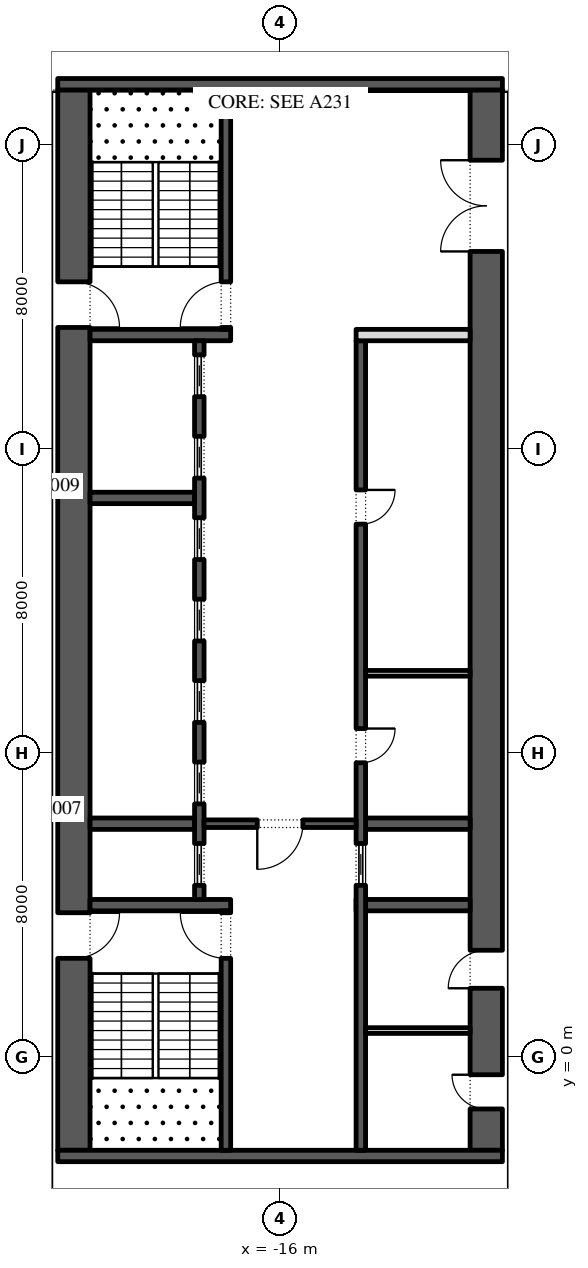
"""IFC4 building model, lengths in metres.
Left out: names, types, materials, properties, quantities, classifications, styles, units other than length and angle.
Written with IfcOpenShell. Run it as: python <this file> out.ifc"""

import sys

from ifc_helpers import new_model, si_unit, direction, frame, frame_2d, origin, place, context, subcontext, project, spatial, rectangle, extrude, element, fill, save


model = new_model("IFC4")
c1 = context("Model", 3, precision=1e-05, world=origin(), true_north=direction((0.0, 1.0)))
c2 = subcontext(c1, "Body", "Model", "MODEL_VIEW")
j1 = project(units=[si_unit("LENGTHUNIT", "METRE"), si_unit("PLANEANGLEUNIT", "RADIAN")], contexts=[c1])
p1 = place(None, origin())
s1 = spatial("IfcSite", under=j1, at=p1, CompositionType="ELEMENT")
p2 = place(p1, origin())
s2 = spatial("IfcBuilding", under=s1, at=p2, CompositionType="ELEMENT")
p3 = place(p2, frame((0.0, 0.0, 130.8)))
s3 = spatial("IfcBuildingStorey", under=s2, at=p3, CompositionType="ELEMENT", Elevation=130.8)
p4 = place(p3, frame((-21.425, -2.45, 0.0), z_axis=(0.0, 0.0, 1.0), x_axis=(0.0, 1.0, 0.0)))
e1 = element("IfcWall", 1, at=p4, inside=s3, PredefinedType="SHEAR", context=c2, shape_type="SweptSolid", body=[
    extrude(rectangle(XDim=27.9, YDim=0.85, at=frame_2d((13.95, 0.0))), origin(), (0.0, 0.0, 1.0), 4.0),
])
p5 = place(p4, frame((5.05, 0.0, 0.0)))
e2 = element("IfcOpeningElement", 2, at=p5, cuts=e1, PredefinedType="OPENING", context=c2, shape_type="SweptSolid", body=[
    extrude(rectangle(XDim=1.2, YDim=2.1, at=frame_2d((0.6, 1.05))), frame((0.0, 0.435, 0.0), z_axis=(0.0, -1.0, 0.0), x_axis=(1.0, 0.0, 0.0)), (0.0, 0.0, 1.0), 0.87),
])
p6 = place(p4, frame((21.65, 0.0, 0.0)))
e3 = element("IfcOpeningElement", 3, at=p6, cuts=e1, PredefinedType="OPENING", context=c2, shape_type="SweptSolid", body=[
    extrude(rectangle(XDim=1.2, YDim=2.1, at=frame_2d((0.6, 1.05))), frame((0.0, 0.435, 0.0), z_axis=(0.0, -1.0, 0.0), x_axis=(1.0, 0.0, 0.0)), (0.0, 0.0, 1.0), 0.87),
])
p7 = place(p3, frame((-10.575, -2.45, 0.0), z_axis=(0.0, 0.0, 1.0), x_axis=(0.0, 1.0, 0.0)))
e4 = element("IfcWall", 4, at=p7, inside=s3, PredefinedType="SHEAR", context=c2, shape_type="SweptSolid", body=[
    extrude(rectangle(XDim=27.9, YDim=0.85, at=frame_2d((13.95, 0.0))), origin(), (0.0, 0.0, 1.0), 4.0),
])
p8 = place(p7, frame((23.65, 0.0, 0.0)))
e5 = element("IfcOpeningElement", 5, at=p8, cuts=e4, PredefinedType="OPENING", context=c2, shape_type="SweptSolid", body=[
    extrude(rectangle(XDim=2.4, YDim=2.1, at=frame_2d((1.2, 1.05))), frame((0.0, 0.435, 0.0), z_axis=(0.0, -1.0, 0.0), x_axis=(1.0, 0.0, 0.0)), (0.0, 0.0, 1.0), 0.87),
])
p9 = place(p7, frame((1.087, 0.0, 0.0)))
e6 = element("IfcOpeningElement", 6, at=p9, cuts=e4, PredefinedType="OPENING", context=c2, shape_type="SweptSolid", body=[
    extrude(rectangle(XDim=0.9, YDim=2.1, at=frame_2d((0.45, 1.05))), frame((0.0, 0.435, 0.0), z_axis=(0.0, -1.0, 0.0), x_axis=(1.0, 0.0, 0.0)), (0.0, 0.0, 1.0), 0.87),
])
p10 = place(p7, frame((4.262, 0.0, 0.0)))
e7 = element("IfcOpeningElement", 7, at=p10, cuts=e4, PredefinedType="OPENING", context=c2, shape_type="SweptSolid", body=[
    extrude(rectangle(XDim=1.0, YDim=2.1, at=frame_2d((0.5, 1.05))), frame((0.0, 0.435, 0.0), z_axis=(0.0, -1.0, 0.0), x_axis=(1.0, 0.0, 0.0)), (0.0, 0.0, 1.0), 0.87),
])
for number, where, z_axis, x_axis in (
    (8, (-21.85, -2.6, 0.0), (0.0, 0.0, 1.0), (1.0, 0.0, 0.0)),
    (9, (-21.85, 25.6, 0.0), (0.0, 0.0, 1.0), (1.0, 0.0, 0.0)),
):
    element("IfcWall", number, at=place(p3, frame(where, z_axis=z_axis, x_axis=x_axis)), inside=s3, PredefinedType="SHEAR", context=c2, shape_type="SweptSolid", body=[
        extrude(rectangle(XDim=11.7, YDim=0.3, at=frame_2d((5.85, 0.0))), origin(), (0.0, 0.0, 1.0), 4.0),
    ])
p11 = place(p3, frame((-21.0, 4.0, 0.0), z_axis=(0.0, 0.0, 1.0), x_axis=(1.0, 0.0, 0.0)))
e10 = element("IfcWall", 10, at=p11, inside=s3, PredefinedType="SHEAR", context=c2, shape_type="SweptSolid", body=[
    extrude(rectangle(XDim=3.7, YDim=0.3, at=frame_2d((1.85, 0.0))), origin(), (0.0, 0.0, 1.0), 4.0),
])
p12 = place(p3, frame((-17.425, -2.45, 0.0), z_axis=(0.0, 0.0, 1.0), x_axis=(0.0, 1.0, 0.0)))
e11 = element("IfcWall", 11, at=p12, inside=s3, PredefinedType="SHEAR", context=c2, shape_type="SweptSolid", body=[
    extrude(rectangle(XDim=6.3, YDim=0.25, at=frame_2d((3.15, 0.0))), origin(), (0.0, 0.0, 1.0), 4.0),
])
p13 = place(p12, frame((5.05, 0.0, 0.0)))
e12 = element("IfcOpeningElement", 12, at=p13, cuts=e11, PredefinedType="OPENING", context=c2, shape_type="SweptSolid", body=[
    extrude(rectangle(XDim=1.2, YDim=2.1, at=frame_2d((0.6, 1.05))), frame((0.0, 0.135, 0.0), z_axis=(0.0, -1.0, 0.0), x_axis=(1.0, 0.0, 0.0)), (0.0, 0.0, 1.0), 0.27),
])
p14 = place(p3, frame((-21.0, 19.0, 0.0), z_axis=(0.0, 0.0, 1.0), x_axis=(1.0, 0.0, 0.0)))
e13 = element("IfcWall", 13, at=p14, inside=s3, PredefinedType="SHEAR", context=c2, shape_type="SweptSolid", body=[
    extrude(rectangle(XDim=3.7, YDim=0.3, at=frame_2d((1.85, 0.0))), origin(), (0.0, 0.0, 1.0), 4.0),
])
p15 = place(p3, frame((-17.425, 19.15, 0.0), z_axis=(0.0, 0.0, 1.0), x_axis=(0.0, 1.0, 0.0)))
e14 = element("IfcWall", 14, at=p15, inside=s3, PredefinedType="SHEAR", context=c2, shape_type="SweptSolid", body=[
    extrude(rectangle(XDim=6.3, YDim=0.25, at=frame_2d((3.15, 0.0))), origin(), (0.0, 0.0, 1.0), 4.0),
])
p16 = place(p15, frame((0.05, 0.0, 0.0)))
e15 = element("IfcOpeningElement", 15, at=p16, cuts=e14, PredefinedType="OPENING", context=c2, shape_type="SweptSolid", body=[
    extrude(rectangle(XDim=1.2, YDim=2.1, at=frame_2d((0.6, 1.05))), frame((0.0, 0.135, 0.0), z_axis=(0.0, -1.0, 0.0), x_axis=(1.0, 0.0, 0.0)), (0.0, 0.0, 1.0), 0.27),
])
for number, where, z_axis, x_axis in (
    (16, (-21.0, 6.143, 0.0), (0.0, 0.0, 1.0), (1.0, 0.0, 0.0)),
    (17, (-21.0, 14.714, 0.0), (0.0, 0.0, 1.0), (1.0, 0.0, 0.0)),
):
    element("IfcWall", number, at=place(p3, frame(where, z_axis=z_axis, x_axis=x_axis)), inside=s3, PredefinedType="SHEAR", context=c2, shape_type="SweptSolid", body=[
        extrude(rectangle(XDim=2.75, YDim=0.3, at=frame_2d((1.375, 0.0))), origin(), (0.0, 0.0, 1.0), 4.0),
    ])
p17 = place(p3, frame((-18.125, 4.15, 0.0), z_axis=(0.0, 0.0, 1.0), x_axis=(0.0, 1.0, 0.0)))
e18 = element("IfcWall", 18, at=p17, inside=s3, PredefinedType="SHEAR", context=c2, shape_type="SweptSolid", body=[
    extrude(rectangle(XDim=14.7, YDim=0.25, at=frame_2d((7.35, 0.0))), origin(), (0.0, 0.0, 1.0), 4.0),
])
p18 = place(p17, frame((0.371, 0.0, 0.0)))
e19 = element("IfcOpeningElement", 19, at=p18, cuts=e18, PredefinedType="OPENING", context=c2, shape_type="SweptSolid", body=[
    extrude(rectangle(XDim=1.1, YDim=2.1, at=frame_2d((0.55, 1.05))), frame((0.0, 0.135, 0.0), z_axis=(0.0, -1.0, 0.0), x_axis=(1.0, 0.0, 0.0)), (0.0, 0.0, 1.0), 0.27),
])
p19 = place(p17, frame((2.514, 0.0, 0.0)))
e20 = element("IfcOpeningElement", 20, at=p19, cuts=e18, PredefinedType="OPENING", context=c2, shape_type="SweptSolid", body=[
    extrude(rectangle(XDim=1.1, YDim=2.1, at=frame_2d((0.55, 1.05))), frame((0.0, 0.135, 0.0), z_axis=(0.0, -1.0, 0.0), x_axis=(1.0, 0.0, 0.0)), (0.0, 0.0, 1.0), 0.27),
])
p20 = place(p17, frame((4.657, 0.0, 0.0)))
e21 = element("IfcOpeningElement", 21, at=p20, cuts=e18, PredefinedType="OPENING", context=c2, shape_type="SweptSolid", body=[
    extrude(rectangle(XDim=1.1, YDim=2.1, at=frame_2d((0.55, 1.05))), frame((0.0, 0.135, 0.0), z_axis=(0.0, -1.0, 0.0), x_axis=(1.0, 0.0, 0.0)), (0.0, 0.0, 1.0), 0.27),
])
p21 = place(p17, frame((6.8, 0.0, 0.0)))
e22 = element("IfcOpeningElement", 22, at=p21, cuts=e18, PredefinedType="OPENING", context=c2, shape_type="SweptSolid", body=[
    extrude(rectangle(XDim=1.1, YDim=2.1, at=frame_2d((0.55, 1.05))), frame((0.0, 0.135, 0.0), z_axis=(0.0, -1.0, 0.0), x_axis=(1.0, 0.0, 0.0)), (0.0, 0.0, 1.0), 0.27),
])
p22 = place(p17, frame((8.943, 0.0, 0.0)))
e23 = element("IfcOpeningElement", 23, at=p22, cuts=e18, PredefinedType="OPENING", context=c2, shape_type="SweptSolid", body=[
    extrude(rectangle(XDim=1.1, YDim=2.1, at=frame_2d((0.55, 1.05))), frame((0.0, 0.135, 0.0), z_axis=(0.0, -1.0, 0.0), x_axis=(1.0, 0.0, 0.0)), (0.0, 0.0, 1.0), 0.27),
])
p23 = place(p17, frame((11.086, 0.0, 0.0)))
e24 = element("IfcOpeningElement", 24, at=p23, cuts=e18, PredefinedType="OPENING", context=c2, shape_type="SweptSolid", body=[
    extrude(rectangle(XDim=1.1, YDim=2.1, at=frame_2d((0.55, 1.05))), frame((0.0, 0.135, 0.0), z_axis=(0.0, -1.0, 0.0), x_axis=(1.0, 0.0, 0.0)), (0.0, 0.0, 1.0), 0.27),
])
p24 = place(p17, frame((13.229, 0.0, 0.0)))
e25 = element("IfcOpeningElement", 25, at=p24, cuts=e18, PredefinedType="OPENING", context=c2, shape_type="SweptSolid", body=[
    extrude(rectangle(XDim=1.1, YDim=2.1, at=frame_2d((0.55, 1.05))), frame((0.0, 0.135, 0.0), z_axis=(0.0, -1.0, 0.0), x_axis=(1.0, 0.0, 0.0)), (0.0, 0.0, 1.0), 0.27),
])
p25 = place(p3, frame((-14.0, 4.0, 0.0), z_axis=(0.0, 0.0, 1.0), x_axis=(1.0, 0.0, 0.0)))
e26 = element("IfcWall", 26, at=p25, inside=s3, PredefinedType="SHEAR", context=c2, shape_type="SweptSolid", body=[
    extrude(rectangle(XDim=3.0, YDim=0.3, at=frame_2d((1.5, 0.0))), origin(), (0.0, 0.0, 1.0), 4.0),
])
p26 = place(p3, frame((-13.75, 6.143, 0.0), z_axis=(0.0, 0.0, 1.0), x_axis=(1.0, 0.0, 0.0)))
e27 = element("IfcWall", 27, at=p26, inside=s3, PredefinedType="SHEAR", context=c2, shape_type="SweptSolid", body=[
    extrude(rectangle(XDim=2.75, YDim=0.3, at=frame_2d((1.375, 0.0))), origin(), (0.0, 0.0, 1.0), 4.0),
])
p27 = place(p3, frame((-13.875, -2.45, 0.0), z_axis=(0.0, 0.0, 1.0), x_axis=(0.0, 1.0, 0.0)))
e28 = element("IfcWall", 28, at=p27, inside=s3, PredefinedType="SHEAR", context=c2, shape_type="SweptSolid", body=[
    extrude(rectangle(XDim=21.3, YDim=0.25, at=frame_2d((10.65, 0.0))), origin(), (0.0, 0.0, 1.0), 4.0),
])
p28 = place(p27, frame((10.196, 0.0, 0.0)))
e29 = element("IfcOpeningElement", 29, at=p28, cuts=e28, PredefinedType="OPENING", context=c2, shape_type="SweptSolid", body=[
    extrude(rectangle(XDim=0.9, YDim=2.1, at=frame_2d((0.45, 1.05))), frame((0.0, 0.135, 0.0), z_axis=(0.0, -1.0, 0.0), x_axis=(1.0, 0.0, 0.0)), (0.0, 0.0, 1.0), 0.27),
])
p29 = place(p27, frame((16.475, 0.0, 0.0)))
e30 = element("IfcOpeningElement", 30, at=p29, cuts=e28, PredefinedType="OPENING", context=c2, shape_type="SweptSolid", body=[
    extrude(rectangle(XDim=0.9, YDim=2.1, at=frame_2d((0.45, 1.05))), frame((0.0, 0.135, 0.0), z_axis=(0.0, -1.0, 0.0), x_axis=(1.0, 0.0, 0.0)), (0.0, 0.0, 1.0), 0.27),
])
p30 = place(p27, frame((6.971, 0.0, 0.0)))
e31 = element("IfcOpeningElement", 31, at=p30, cuts=e28, PredefinedType="OPENING", context=c2, shape_type="SweptSolid", body=[
    extrude(rectangle(XDim=1.1, YDim=2.1, at=frame_2d((0.55, 1.05))), frame((0.0, 0.135, 0.0), z_axis=(0.0, -1.0, 0.0), x_axis=(1.0, 0.0, 0.0)), (0.0, 0.0, 1.0), 0.27),
])
p31 = place(p3, frame((-14.0, 19.0, 0.0), z_axis=(0.0, 0.0, 1.0), x_axis=(1.0, 0.0, 0.0)))
e32 = element("IfcWall", 32, at=p31, inside=s3, PredefinedType="PARTITIONING", context=c2, shape_type="SweptSolid", body=[
    extrude(rectangle(XDim=3.0, YDim=0.3, at=frame_2d((1.5, 0.0))), origin(), (0.0, 0.0, 1.0), 4.0),
])
p32 = place(p3, frame((-13.75, 10.1, 0.0), z_axis=(0.0, 0.0, 1.0), x_axis=(1.0, 0.0, 0.0)))
e33 = element("IfcWall", 33, at=p32, inside=s3, PredefinedType="PARTITIONING", context=c2, shape_type="SweptSolid", body=[
    extrude(rectangle(XDim=2.75, YDim=0.15, at=frame_2d((1.375, 0.0))), origin(), (0.0, 0.0, 1.0), 4.0),
])
p33 = place(p3, frame((-18.0, 6.143, 0.0), z_axis=(0.0, 0.0, 1.0), x_axis=(1.0, 0.0, 0.0)))
e34 = element("IfcWall", 34, at=p33, inside=s3, PredefinedType="SHEAR", context=c2, shape_type="SweptSolid", body=[
    extrude(rectangle(XDim=4.0, YDim=0.2, at=frame_2d((2.0, 0.0))), origin(), (0.0, 0.0, 1.0), 4.0),
])
p34 = place(p33, frame((1.4, 0.0, 0.0)))
e35 = element("IfcOpeningElement", 35, at=p34, cuts=e34, PredefinedType="OPENING", context=c2, shape_type="SweptSolid", body=[
    extrude(rectangle(XDim=1.2, YDim=2.1, at=frame_2d((0.6, 1.05))), frame((0.0, 0.11, 0.0), z_axis=(0.0, -1.0, 0.0), x_axis=(1.0, 0.0, 0.0)), (0.0, 0.0, 1.0), 0.22),
])
p35 = place(p3, frame((-13.75, 0.7, 0.0), z_axis=(0.0, 0.0, 1.0), x_axis=(1.0, 0.0, 0.0)))
e36 = element("IfcWall", 36, at=p35, inside=s3, PredefinedType="PARTITIONING", context=c2, shape_type="SweptSolid", body=[
    extrude(rectangle(XDim=2.75, YDim=0.15, at=frame_2d((1.375, 0.0))), origin(), (0.0, 0.0, 1.0), 4.0),
])
p36 = place(p18, origin())
e37 = element("IfcDoor", 37, at=p36, inside=s3, OperationType="SLIDING_TO_LEFT", PredefinedType="DOOR", context=c2, shape_type="SweptSolid", body=[
    extrude(rectangle(XDim=1.1, YDim=2.1, at=frame_2d((0.55, 1.05))), frame((0.0, 0.025, 0.0), z_axis=(0.0, -1.0, 0.0), x_axis=(1.0, 0.0, 0.0)), (0.0, 0.0, 1.0), 0.05),
])
fill(e19, e37)
p37 = place(p19, origin())
e38 = element("IfcDoor", 38, at=p37, inside=s3, OperationType="SLIDING_TO_LEFT", PredefinedType="DOOR", context=c2, shape_type="SweptSolid", body=[
    extrude(rectangle(XDim=1.1, YDim=2.1, at=frame_2d((0.55, 1.05))), frame((0.0, 0.025, 0.0), z_axis=(0.0, -1.0, 0.0), x_axis=(1.0, 0.0, 0.0)), (0.0, 0.0, 1.0), 0.05),
])
fill(e20, e38)
p38 = place(p20, origin())
e39 = element("IfcDoor", 39, at=p38, inside=s3, OperationType="SLIDING_TO_LEFT", PredefinedType="DOOR", context=c2, shape_type="SweptSolid", body=[
    extrude(rectangle(XDim=1.1, YDim=2.1, at=frame_2d((0.55, 1.05))), frame((0.0, 0.025, 0.0), z_axis=(0.0, -1.0, 0.0), x_axis=(1.0, 0.0, 0.0)), (0.0, 0.0, 1.0), 0.05),
])
fill(e21, e39)
p39 = place(p21, origin())
e40 = element("IfcDoor", 40, at=p39, inside=s3, OperationType="SLIDING_TO_LEFT", PredefinedType="DOOR", context=c2, shape_type="SweptSolid", body=[
    extrude(rectangle(XDim=1.1, YDim=2.1, at=frame_2d((0.55, 1.05))), frame((0.0, 0.025, 0.0), z_axis=(0.0, -1.0, 0.0), x_axis=(1.0, 0.0, 0.0)), (0.0, 0.0, 1.0), 0.05),
])
fill(e22, e40)
p40 = place(p22, origin())
e41 = element("IfcDoor", 41, at=p40, inside=s3, OperationType="SLIDING_TO_LEFT", PredefinedType="DOOR", context=c2, shape_type="SweptSolid", body=[
    extrude(rectangle(XDim=1.1, YDim=2.1, at=frame_2d((0.55, 1.05))), frame((0.0, 0.025, 0.0), z_axis=(0.0, -1.0, 0.0), x_axis=(1.0, 0.0, 0.0)), (0.0, 0.0, 1.0), 0.05),
])
fill(e23, e41)
p41 = place(p23, origin())
e42 = element("IfcDoor", 42, at=p41, inside=s3, OperationType="SLIDING_TO_LEFT", PredefinedType="DOOR", context=c2, shape_type="SweptSolid", body=[
    extrude(rectangle(XDim=1.1, YDim=2.1, at=frame_2d((0.55, 1.05))), frame((0.0, 0.025, 0.0), z_axis=(0.0, -1.0, 0.0), x_axis=(1.0, 0.0, 0.0)), (0.0, 0.0, 1.0), 0.05),
])
fill(e24, e42)
p42 = place(p24, origin())
e43 = element("IfcDoor", 43, at=p42, inside=s3, OperationType="SLIDING_TO_LEFT", PredefinedType="DOOR", context=c2, shape_type="SweptSolid", body=[
    extrude(rectangle(XDim=1.1, YDim=2.1, at=frame_2d((0.55, 1.05))), frame((0.0, 0.025, 0.0), z_axis=(0.0, -1.0, 0.0), x_axis=(1.0, 0.0, 0.0)), (0.0, 0.0, 1.0), 0.05),
])
fill(e25, e43)
p43 = place(p28, frame((0.9, -0.2, 0.0), z_axis=(0.0, 0.0, 1.0), x_axis=(-1.0, 0.0, 0.0)))
e44 = element("IfcDoor", 44, at=p43, inside=s3, OperationType="SINGLE_SWING_RIGHT", PredefinedType="DOOR", context=c2, shape_type="SweptSolid", body=[
    extrude(rectangle(XDim=0.9, YDim=2.1, at=frame_2d((0.45, 1.05))), frame((0.0, -0.075, 0.0), z_axis=(0.0, -1.0, 0.0), x_axis=(1.0, 0.0, 0.0)), (0.0, 0.0, 1.0), 0.05),
])
fill(e29, e44)
p44 = place(p29, frame((0.9, -0.2, 0.0), z_axis=(0.0, 0.0, 1.0), x_axis=(-1.0, 0.0, 0.0)))
e45 = element("IfcDoor", 45, at=p44, inside=s3, OperationType="SINGLE_SWING_RIGHT", PredefinedType="DOOR", context=c2, shape_type="SweptSolid", body=[
    extrude(rectangle(XDim=0.9, YDim=2.1, at=frame_2d((0.45, 1.05))), frame((0.0, -0.075, 0.0), z_axis=(0.0, -1.0, 0.0), x_axis=(1.0, 0.0, 0.0)), (0.0, 0.0, 1.0), 0.05),
])
fill(e30, e45)
p45 = place(p30, origin())
e46 = element("IfcDoor", 46, at=p45, inside=s3, OperationType="SLIDING_TO_LEFT", PredefinedType="DOOR", context=c2, shape_type="SweptSolid", body=[
    extrude(rectangle(XDim=1.1, YDim=2.1, at=frame_2d((0.55, 1.05))), frame((0.0, 0.025, 0.0), z_axis=(0.0, -1.0, 0.0), x_axis=(1.0, 0.0, 0.0)), (0.0, 0.0, 1.0), 0.05),
])
fill(e31, e46)
p46 = place(p34, frame((1.2, 0.0, 0.0), z_axis=(0.0, 0.0, 1.0), x_axis=(-1.0, 0.0, 0.0)))
e47 = element("IfcDoor", 47, at=p46, inside=s3, OperationType="SINGLE_SWING_LEFT", PredefinedType="DOOR", context=c2, shape_type="SweptSolid", body=[
    extrude(rectangle(XDim=1.2, YDim=2.1, at=frame_2d((0.6, 1.05))), frame((0.0, 0.025, 0.0), z_axis=(0.0, -1.0, 0.0), x_axis=(1.0, 0.0, 0.0)), (0.0, 0.0, 1.0), 0.05),
])
fill(e35, e47)
p47 = place(p8, origin())
e48 = element("IfcDoor", 48, at=p47, inside=s3, OperationType="DOUBLE_DOOR_SINGLE_SWING", PredefinedType="DOOR", context=c2, shape_type="SweptSolid", body=[
    extrude(rectangle(XDim=2.4, YDim=2.1, at=frame_2d((1.2, 1.05))), frame((0.0, 0.025, 0.0), z_axis=(0.0, -1.0, 0.0), x_axis=(1.0, 0.0, 0.0)), (0.0, 0.0, 1.0), 0.05),
])
fill(e5, e48)
p48 = place(p13, origin())
e49 = element("IfcDoor", 49, at=p48, inside=s3, OperationType="SINGLE_SWING_LEFT", PredefinedType="DOOR", context=c2, shape_type="SweptSolid", body=[
    extrude(rectangle(XDim=1.2, YDim=2.1, at=frame_2d((0.6, 1.05))), frame((0.0, 0.025, 0.0), z_axis=(0.0, -1.0, 0.0), x_axis=(1.0, 0.0, 0.0)), (0.0, 0.0, 1.0), 0.05),
])
fill(e12, e49)
p49 = place(p5, frame((1.2, 0.0, 0.0), z_axis=(0.0, 0.0, 1.0), x_axis=(-1.0, 0.0, 0.0)))
e50 = element("IfcDoor", 50, at=p49, inside=s3, OperationType="SINGLE_SWING_RIGHT", PredefinedType="DOOR", context=c2, shape_type="SweptSolid", body=[
    extrude(rectangle(XDim=1.2, YDim=2.1, at=frame_2d((0.6, 1.05))), frame((0.0, 0.025, 0.0), z_axis=(0.0, -1.0, 0.0), x_axis=(1.0, 0.0, 0.0)), (0.0, 0.0, 1.0), 0.05),
])
fill(e2, e50)
p50 = place(p16, origin())
e51 = element("IfcDoor", 51, at=p50, inside=s3, OperationType="SINGLE_SWING_RIGHT", PredefinedType="DOOR", context=c2, shape_type="SweptSolid", body=[
    extrude(rectangle(XDim=1.2, YDim=2.1, at=frame_2d((0.6, 1.05))), frame((0.0, 0.025, 0.0), z_axis=(0.0, -1.0, 0.0), x_axis=(1.0, 0.0, 0.0)), (0.0, 0.0, 1.0), 0.05),
])
fill(e15, e51)
p51 = place(p6, frame((1.2, 0.0, 0.0), z_axis=(0.0, 0.0, 1.0), x_axis=(-1.0, 0.0, 0.0)))
e52 = element("IfcDoor", 52, at=p51, inside=s3, OperationType="SINGLE_SWING_LEFT", PredefinedType="DOOR", context=c2, shape_type="SweptSolid", body=[
    extrude(rectangle(XDim=1.2, YDim=2.1, at=frame_2d((0.6, 1.05))), frame((0.0, 0.025, 0.0), z_axis=(0.0, -1.0, 0.0), x_axis=(1.0, 0.0, 0.0)), (0.0, 0.0, 1.0), 0.05),
])
fill(e3, e52)
p52 = place(p9, origin())
e53 = element("IfcDoor", 53, at=p52, inside=s3, OperationType="SINGLE_SWING_LEFT", PredefinedType="DOOR", context=c2, shape_type="SweptSolid", body=[
    extrude(rectangle(XDim=0.9, YDim=2.1, at=frame_2d((0.45, 1.05))), frame((0.0, 0.425, 0.0), z_axis=(0.0, -1.0, 0.0), x_axis=(1.0, 0.0, 0.0)), (0.0, 0.0, 1.0), 0.05),
])
fill(e6, e53)
p53 = place(p10, origin())
e54 = element("IfcDoor", 54, at=p53, inside=s3, OperationType="SINGLE_SWING_RIGHT", PredefinedType="DOOR", context=c2, shape_type="SweptSolid", body=[
    extrude(rectangle(XDim=1.0, YDim=2.1, at=frame_2d((0.5, 1.05))), frame((0.0, 0.425, 0.0), z_axis=(0.0, -1.0, 0.0), x_axis=(1.0, 0.0, 0.0)), (0.0, 0.0, 1.0), 0.05),
])
fill(e7, e54)
save(model, sys.argv[1])
